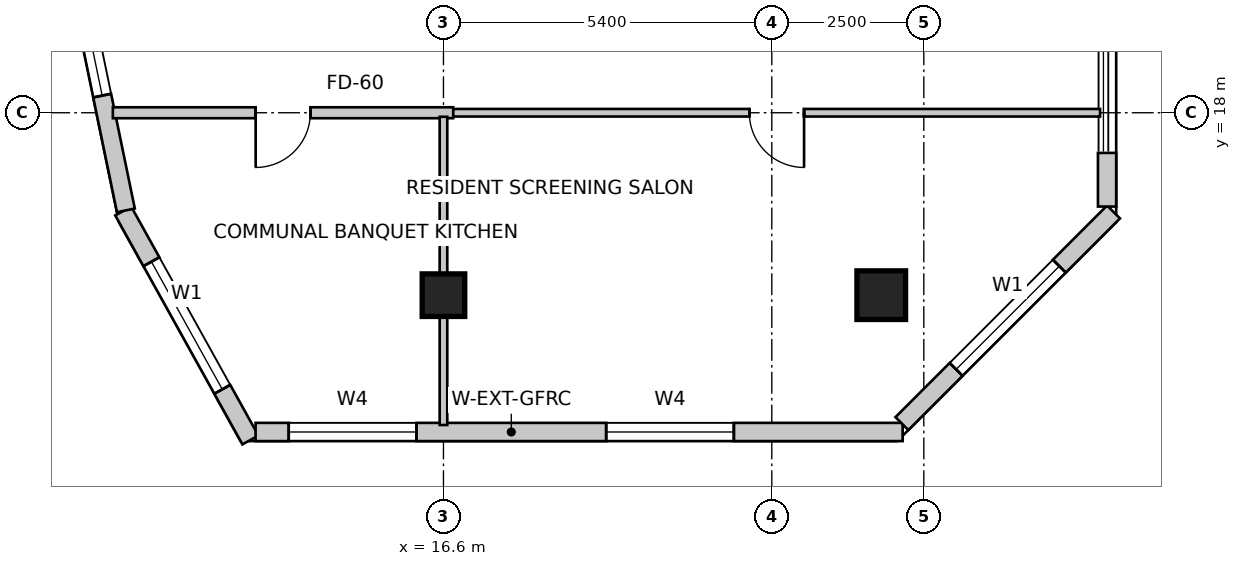
"""IFC4 building model, lengths in metres.
Left out: names, types, materials, properties, quantities, classifications, styles, units other than length and angle.
Written with IfcOpenShell. Run it as: python <this file> out.ifc"""

import sys

from ifc_helpers import new_model, si_unit, direction, frame, frame_2d, origin, origin_2d, place, context, subcontext, project, spatial, rectangle, extrude, source, transform, mapped, element, fill, save


model = new_model("IFC4")
c1 = context("Model", 3, precision=1e-05, world=origin(), true_north=direction((0.0, 1.0)))
c2 = subcontext(c1, "Body", "Model", "MODEL_VIEW")
j1 = project(units=[si_unit("LENGTHUNIT", "METRE"), si_unit("PLANEANGLEUNIT", "RADIAN")], contexts=[c1])
p1 = place(None, origin())
s1 = spatial("IfcSite", under=j1, at=p1, CompositionType="ELEMENT")
p2 = place(p1, origin())
s2 = spatial("IfcBuilding", under=s1, at=p2, CompositionType="ELEMENT")
p3 = place(p2, frame((0.0, 0.0, 211.4)))
s3 = spatial("IfcBuildingStorey", under=s2, at=p3, CompositionType="ELEMENT", Elevation=211.4)
m1 = source(origin(), c2, "Body", "SweptSolid", [
    extrude(rectangle(XDim=0.8, YDim=0.8, at=origin_2d()), origin(), (0.0, 0.0, 1.0), 3.5),
])
p4 = place(p3, frame((23.8, 15.0, 0.0), z_axis=(0.0, 0.0, 1.0), x_axis=(1.0, 0.0, 0.0)))
e1 = element("IfcColumn", 1, at=p4, inside=s3, PredefinedType="COLUMN", context=c2, shape_type="MappedRepresentation", body=[
    mapped(m1, transform((0.0, 0.0, 0.0), scale=1.0)),
])
m2 = source(origin(), c2, "Body", "SweptSolid", [
    extrude(rectangle(XDim=0.7, YDim=0.7, at=origin_2d()), origin(), (0.0, 0.0, 1.0), 3.5),
])
p5 = place(p3, frame((16.6, 15.0, 0.0), z_axis=(0.0, 0.0, 1.0), x_axis=(1.0, 0.0, 0.0)))
e2 = element("IfcColumn", 2, at=p5, inside=s3, PredefinedType="COLUMN", context=c2, shape_type="MappedRepresentation", body=[
    mapped(m2, transform((0.0, 0.0, 0.0), scale=1.0)),
])
p6 = place(p3, frame((11.333, 16.384, 0.0), z_axis=(0.0, 0.0, 1.0), x_axis=(0.485633305139, -0.874162623852, 0.0)))
e3 = element("IfcWall", 3, at=p6, inside=s3, PredefinedType="SOLIDWALL", context=c2, shape_type="SweptSolid", body=[
    extrude(rectangle(XDim=4.307, YDim=0.3, at=frame_2d((2.153, 0.0))), origin(), (0.0, 0.0, 1.0), 3.25),
])
m3 = source(origin(), c2, "Body", "SweptSolid", [
    extrude(rectangle(XDim=2.4, YDim=2.2, at=frame_2d((1.2, 1.1))), frame((0.0, 0.16, 0.0), z_axis=(0.0, -1.0, 0.0), x_axis=(1.0, 0.0, 0.0)), (0.0, 0.0, 1.0), 0.32),
])
p7 = place(p6, frame((0.954, 0.0, 0.85)))
e4 = element("IfcOpeningElement", 4, at=p7, cuts=e3, PredefinedType="OPENING", context=c2, shape_type="MappedRepresentation", body=[
    mapped(m3, transform((0.0, 0.0, 0.0), scale=1.0)),
])
p8 = place(p3, frame((13.51, 12.75, 0.0), z_axis=(0.0, 0.0, 1.0), x_axis=(1.0, 0.0, 0.0)))
e5 = element("IfcWall", 5, at=p8, inside=s3, PredefinedType="SOLIDWALL", context=c2, shape_type="SweptSolid", body=[
    extrude(rectangle(XDim=10.642, YDim=0.3, at=frame_2d((5.321, 0.0))), origin(), (0.0, 0.0, 1.0), 3.25),
])
m4 = source(origin(), c2, "Body", "SweptSolid", [
    extrude(rectangle(XDim=2.1, YDim=2.0, at=frame_2d((1.05, 1.0))), frame((0.0, 0.16, 0.0), z_axis=(0.0, -1.0, 0.0), x_axis=(1.0, 0.0, 0.0)), (0.0, 0.0, 1.0), 0.32),
])
p9 = place(p8, frame((0.545, 0.0, 0.85)))
e6 = element("IfcOpeningElement", 6, at=p9, cuts=e5, PredefinedType="OPENING", context=c2, shape_type="MappedRepresentation", body=[
    mapped(m4, transform((0.0, 0.0, 0.0), scale=1.0)),
])
p10 = place(p8, frame((5.766, 0.0, 0.85)))
e7 = element("IfcOpeningElement", 7, at=p10, cuts=e5, PredefinedType="OPENING", context=c2, shape_type="MappedRepresentation", body=[
    mapped(m4, transform((0.0, 0.0, 0.0), scale=1.0)),
])
p11 = place(p3, frame((24.14, 12.888, 0.0), z_axis=(0.0, 0.0, 1.0), x_axis=(0.707106781187, 0.707106781187, 0.0)))
e8 = element("IfcWall", 8, at=p11, inside=s3, PredefinedType="SOLIDWALL", context=c2, shape_type="SweptSolid", body=[
    extrude(rectangle(XDim=4.922, YDim=0.3, at=frame_2d((2.461, 0.0))), origin(), (0.0, 0.0, 1.0), 3.25),
])
p12 = place(p11, frame((1.261, 0.0, 0.85)))
e9 = element("IfcOpeningElement", 9, at=p12, cuts=e8, PredefinedType="OPENING", context=c2, shape_type="MappedRepresentation", body=[
    mapped(m3, transform((0.0, 0.0, 0.0), scale=1.0)),
])
p13 = place(p3, frame((27.514, 16.457, 0.0), z_axis=(0.0, 0.0, 1.0), x_axis=(0.0, 1.0, 0.0)))
e10 = element("IfcWall", 10, at=p13, inside=s3, PredefinedType="SOLIDWALL", context=c2, shape_type="SweptSolid", body=[
    extrude(rectangle(XDim=0.882, YDim=0.3, at=frame_2d((0.441, 0.0))), origin(), (0.0, 0.0, 1.0), 3.25),
])
p14 = place(p3, frame((8.188, 31.834, 0.0), z_axis=(0.0, 0.0, 1.0), x_axis=(0.202303475707, -0.979322880217, 0.0)))
e11 = element("IfcWall", 11, at=p14, inside=s3, PredefinedType="SOLIDWALL", context=c2, shape_type="SweptSolid", body=[
    extrude(rectangle(XDim=15.766, YDim=0.3, at=frame_2d((7.883, 0.0))), origin(), (0.0, 0.0, 1.0), 3.25),
])
m5 = source(origin(), c2, "Body", "SweptSolid", [
    extrude(rectangle(XDim=1.6, YDim=2.15, at=frame_2d((0.8, 1.075))), frame((0.0, 0.16, 0.0), z_axis=(0.0, -1.0, 0.0), x_axis=(1.0, 0.0, 0.0)), (0.0, 0.0, 1.0), 0.32),
])
p15 = place(p14, frame((9.466, 0.0, 0.0)))
e12 = element("IfcOpeningElement", 12, at=p15, cuts=e11, PredefinedType="OPENING", context=c2, shape_type="MappedRepresentation", body=[
    mapped(m5, transform((0.0, 0.0, 0.0), scale=1.0)),
])
p16 = place(p14, frame((1.337, 0.0, 0.85)))
e13 = element("IfcOpeningElement", 13, at=p16, cuts=e11, PredefinedType="OPENING", context=c2, shape_type="MappedRepresentation", body=[
    mapped(m3, transform((0.0, 0.0, 0.0), scale=1.0)),
])
p17 = place(p14, frame((5.92, 0.0, 0.85)))
e14 = element("IfcOpeningElement", 14, at=p17, cuts=e11, PredefinedType="OPENING", context=c2, shape_type="MappedRepresentation", body=[
    mapped(m4, transform((0.0, 0.0, 0.0), scale=1.0)),
])
p18 = place(p14, frame((11.438, 0.0, 0.85)))
e15 = element("IfcOpeningElement", 15, at=p18, cuts=e11, PredefinedType="OPENING", context=c2, shape_type="MappedRepresentation", body=[
    mapped(m3, transform((0.0, 0.0, 0.0), scale=1.0)),
])
p19 = place(p3, frame((16.76, 18.0, 0.0), z_axis=(0.0, 0.0, 1.0), x_axis=(-1.0, 0.0, 0.0)))
e16 = element("IfcWall", 16, at=p19, inside=s3, PredefinedType="PARTITIONING", context=c2, shape_type="SweptSolid", body=[
    extrude(rectangle(XDim=5.597, YDim=0.18, at=frame_2d((2.799, 0.0))), origin(), (0.0, 0.0, 1.0), 3.25),
])
m6 = source(origin(), c2, "Body", "SweptSolid", [
    extrude(rectangle(XDim=0.9, YDim=2.15, at=frame_2d((0.45, 1.075))), frame((0.0, 0.1, 0.0), z_axis=(0.0, -1.0, 0.0), x_axis=(1.0, 0.0, 0.0)), (0.0, 0.0, 1.0), 0.2),
])
p20 = place(p19, frame((2.349, 0.0, 0.0)))
e17 = element("IfcOpeningElement", 17, at=p20, cuts=e16, PredefinedType="OPENING", context=c2, shape_type="MappedRepresentation", body=[
    mapped(m6, transform((0.0, 0.0, 0.0), scale=1.0)),
])
p21 = place(p3, frame((27.399, 18.0, 0.0), z_axis=(0.0, 0.0, 1.0), x_axis=(-1.0, 0.0, 0.0)))
e18 = element("IfcWall", 18, at=p21, inside=s3, PredefinedType="PARTITIONING", context=c2, shape_type="SweptSolid", body=[
    extrude(rectangle(XDim=10.637, YDim=0.125, at=frame_2d((5.318, 0.0))), origin(), (0.0, 0.0, 1.0), 2.542),
])
m7 = source(origin(), c2, "Body", "SweptSolid", [
    extrude(rectangle(XDim=0.9, YDim=2.15, at=frame_2d((0.45, 1.075))), frame((0.0, 0.073, 0.0), z_axis=(0.0, -1.0, 0.0), x_axis=(1.0, 0.0, 0.0)), (0.0, 0.0, 1.0), 0.145),
])
p22 = place(p21, frame((4.868, 0.0, 0.0)))
e19 = element("IfcOpeningElement", 19, at=p22, cuts=e18, PredefinedType="OPENING", context=c2, shape_type="MappedRepresentation", body=[
    mapped(m7, transform((0.0, 0.0, 0.0), scale=1.0)),
])
p23 = place(p3, frame((16.6, 17.934, 0.0), z_axis=(0.0, 0.0, 1.0), x_axis=(0.0, -1.0, 0.0)))
e20 = element("IfcWall", 20, at=p23, inside=s3, PredefinedType="PARTITIONING", context=c2, shape_type="SweptSolid", body=[
    extrude(rectangle(XDim=5.069, YDim=0.125, at=frame_2d((2.534, 0.0))), origin(), (0.0, 0.0, 1.0), 2.542),
])
m8 = source(origin(), c2, "Body", "SweptSolid", [
    extrude(rectangle(XDim=2.4, YDim=2.2, at=frame_2d((1.2, 1.1))), frame((0.0, -0.015, 0.0), z_axis=(0.0, -1.0, 0.0), x_axis=(1.0, 0.0, 0.0)), (0.0, 0.0, 1.0), 0.06),
])
p24 = place(p7, origin())
e21 = element("IfcWindow", 21, at=p24, inside=s3, PartitioningType="SINGLE_PANEL", PredefinedType="WINDOW", context=c2, shape_type="MappedRepresentation", body=[
    mapped(m8, transform((0.0, 0.0, 0.0), scale=1.0)),
])
fill(e4, e21)
m9 = source(origin(), c2, "Body", "SweptSolid", [
    extrude(rectangle(XDim=2.1, YDim=2.0, at=frame_2d((1.05, 1.0))), frame((0.0, -0.015, 0.0), z_axis=(0.0, -1.0, 0.0), x_axis=(1.0, 0.0, 0.0)), (0.0, 0.0, 1.0), 0.06),
])
p25 = place(p9, origin())
e22 = element("IfcWindow", 22, at=p25, inside=s3, PartitioningType="SINGLE_PANEL", PredefinedType="WINDOW", context=c2, shape_type="MappedRepresentation", body=[
    mapped(m9, transform((0.0, 0.0, 0.0), scale=1.0)),
])
fill(e6, e22)
p26 = place(p10, origin())
e23 = element("IfcWindow", 23, at=p26, inside=s3, PartitioningType="SINGLE_PANEL", PredefinedType="WINDOW", context=c2, shape_type="MappedRepresentation", body=[
    mapped(m9, transform((0.0, 0.0, 0.0), scale=1.0)),
])
fill(e7, e23)
p27 = place(p12, origin())
e24 = element("IfcWindow", 24, at=p27, inside=s3, PartitioningType="SINGLE_PANEL", PredefinedType="WINDOW", context=c2, shape_type="MappedRepresentation", body=[
    mapped(m8, transform((0.0, 0.0, 0.0), scale=1.0)),
])
fill(e9, e24)
p28 = place(p18, origin())
e25 = element("IfcWindow", 25, at=p28, inside=s3, PartitioningType="SINGLE_PANEL", PredefinedType="WINDOW", context=c2, shape_type="MappedRepresentation", body=[
    mapped(m8, transform((0.0, 0.0, 0.0), scale=1.0)),
])
fill(e15, e25)
m10 = source(origin(), c2, "Body", "SweptSolid", [
    extrude(rectangle(XDim=0.9, YDim=2.15, at=frame_2d((0.45, 1.075))), frame((0.0, 0.025, 0.0), z_axis=(0.0, -1.0, 0.0), x_axis=(1.0, 0.0, 0.0)), (0.0, 0.0, 1.0), 0.05),
])
p29 = place(p20, origin())
e26 = element("IfcDoor", 26, at=p29, inside=s3, OperationType="SINGLE_SWING_RIGHT", PredefinedType="DOOR", context=c2, shape_type="MappedRepresentation", body=[
    mapped(m10, transform((0.0, 0.0, 0.0), scale=1.0)),
])
fill(e17, e26)
m11 = source(origin(), c2, "Body", "SweptSolid", [
    extrude(rectangle(XDim=0.9, YDim=2.15, at=frame_2d((0.45, 1.075))), frame((0.0, 0.025, 0.0), z_axis=(0.0, -1.0, 0.0), x_axis=(1.0, 0.0, 0.0)), (0.0, 0.0, 1.0), 0.05),
])
p30 = place(p22, origin())
e27 = element("IfcDoor", 27, at=p30, inside=s3, OperationType="SINGLE_SWING_LEFT", PredefinedType="DOOR", context=c2, shape_type="MappedRepresentation", body=[
    mapped(m11, transform((0.0, 0.0, 0.0), scale=1.0)),
])
fill(e19, e27)
save(model, sys.argv[1])
